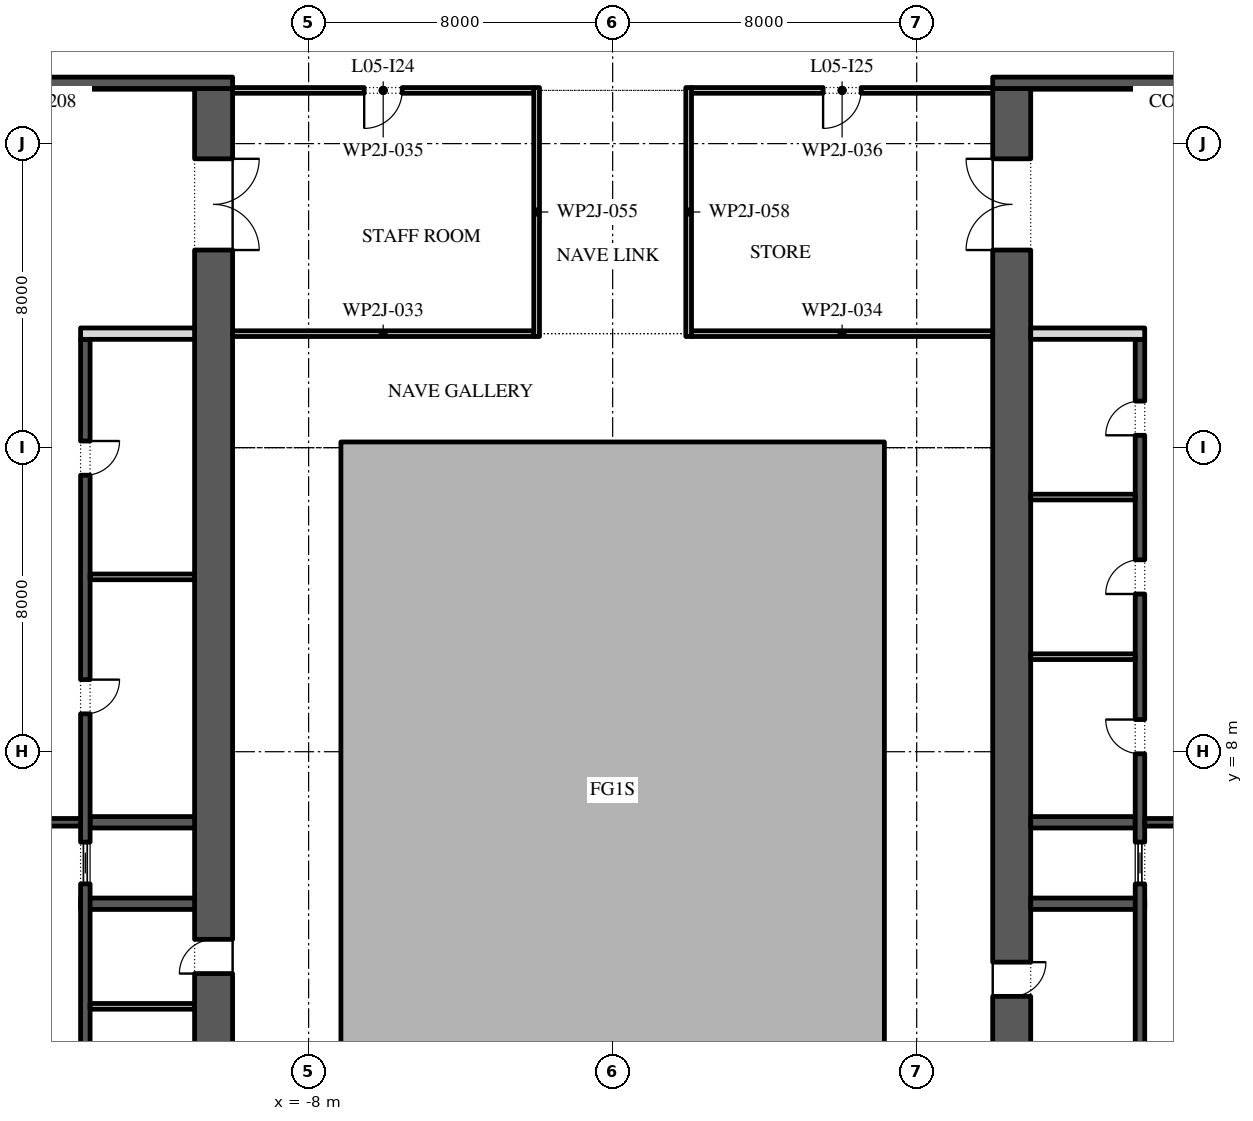
"""IFC4 building model, lengths in metres.
Left out: names, types, materials, properties, quantities, classifications, styles, units other than length and angle.
Written with IfcOpenShell. Run it as: python <this file> out.ifc"""

import sys

from ifc_helpers import new_model, si_unit, direction, frame, frame_2d, origin, place, context, subcontext, project, spatial, polyline, rectangle, outline, extrude, element, fill, save


model = new_model("IFC4")
c1 = context("Model", 3, precision=1e-05, world=origin(), true_north=direction((0.0, 1.0)))
c2 = subcontext(c1, "Body", "Model", "MODEL_VIEW")
j1 = project(units=[si_unit("LENGTHUNIT", "METRE"), si_unit("PLANEANGLEUNIT", "RADIAN")], contexts=[c1])
p1 = place(None, origin())
s1 = spatial("IfcSite", under=j1, at=p1, CompositionType="ELEMENT")
p2 = place(p1, origin())
s2 = spatial("IfcBuilding", under=s1, at=p2, CompositionType="ELEMENT")
p3 = place(p2, frame((0.0, 0.0, 28.8)))
s3 = spatial("IfcBuildingStorey", under=s2, at=p3, CompositionType="ELEMENT", Elevation=28.8)
p4 = place(p3, origin())
e1 = element("IfcWall", 1, at=p4, inside=s3, PredefinedType="STANDARD", context=c2, shape_type="SweptSolid", body=[
    extrude(outline(polyline([(-7.15, -2.15), (7.15, -2.15), (7.15, 16.15), (-7.15, 16.15), (-7.15, -2.15)]), holes=[polyline([(-7.0, -2.0), (-7.0, 16.0), (7.0, 16.0), (7.0, -2.0), (-7.0, -2.0)])]), origin(), (0.0, 0.0, 1.0), 4.35),
])
p5 = place(p3, frame((-10.5, -2.45, 0.0), z_axis=(0.0, 0.0, 1.0), x_axis=(0.0, 1.0, 0.0)))
e2 = element("IfcWall", 2, at=p5, inside=s3, PredefinedType="SHEAR", context=c2, shape_type="SweptSolid", body=[
    extrude(rectangle(XDim=27.9, YDim=1.0, at=frame_2d((13.95, 0.0))), origin(), (0.0, 0.0, 1.0), 4.35),
])
p6 = place(p5, frame((23.65, 0.0, 0.0)))
e3 = element("IfcOpeningElement", 3, at=p6, cuts=e2, PredefinedType="OPENING", context=c2, shape_type="SweptSolid", body=[
    extrude(rectangle(XDim=2.4, YDim=2.1, at=frame_2d((1.2, 1.05))), frame((0.0, 0.51, 0.0), z_axis=(0.0, -1.0, 0.0), x_axis=(1.0, 0.0, 0.0)), (0.0, 0.0, 1.0), 1.02),
])
p7 = place(p5, frame((1.387, 0.0, 0.0)))
e4 = element("IfcOpeningElement", 4, at=p7, cuts=e2, PredefinedType="OPENING", context=c2, shape_type="SweptSolid", body=[
    extrude(rectangle(XDim=0.9, YDim=2.1, at=frame_2d((0.45, 1.05))), frame((0.0, 0.51, 0.0), z_axis=(0.0, -1.0, 0.0), x_axis=(1.0, 0.0, 0.0)), (0.0, 0.0, 1.0), 1.02),
])
p8 = place(p5, frame((4.613, 0.0, 0.0)))
e5 = element("IfcOpeningElement", 5, at=p8, cuts=e2, PredefinedType="OPENING", context=c2, shape_type="SweptSolid", body=[
    extrude(rectangle(XDim=0.9, YDim=2.1, at=frame_2d((0.45, 1.05))), frame((0.0, 0.51, 0.0), z_axis=(0.0, -1.0, 0.0), x_axis=(1.0, 0.0, 0.0)), (0.0, 0.0, 1.0), 1.02),
])
p9 = place(p3, frame((-22.0, 25.6, 0.0), z_axis=(0.0, 0.0, 1.0), x_axis=(1.0, 0.0, 0.0)))
e6 = element("IfcWall", 6, at=p9, inside=s3, PredefinedType="SHEAR", context=c2, shape_type="SweptSolid", body=[
    extrude(rectangle(XDim=12.0, YDim=0.3, at=frame_2d((6.0, 0.0))), origin(), (0.0, 0.0, 1.0), 4.35),
])
p10 = place(p3, frame((-14.0, 4.0, 0.0), z_axis=(0.0, 0.0, 1.0), x_axis=(1.0, 0.0, 0.0)))
e7 = element("IfcWall", 7, at=p10, inside=s3, PredefinedType="SHEAR", context=c2, shape_type="SweptSolid", body=[
    extrude(rectangle(XDim=3.0, YDim=0.3, at=frame_2d((1.5, 0.0))), origin(), (0.0, 0.0, 1.0), 4.35),
])
p11 = place(p3, frame((-13.75, 6.143, 0.0), z_axis=(0.0, 0.0, 1.0), x_axis=(1.0, 0.0, 0.0)))
e8 = element("IfcWall", 8, at=p11, inside=s3, PredefinedType="SHEAR", context=c2, shape_type="SweptSolid", body=[
    extrude(rectangle(XDim=2.75, YDim=0.3, at=frame_2d((1.375, 0.0))), origin(), (0.0, 0.0, 1.0), 4.35),
])
p12 = place(p3, frame((-13.875, -2.45, 0.0), z_axis=(0.0, 0.0, 1.0), x_axis=(0.0, 1.0, 0.0)))
e9 = element("IfcWall", 9, at=p12, inside=s3, PredefinedType="SHEAR", context=c2, shape_type="SweptSolid", body=[
    extrude(rectangle(XDim=21.3, YDim=0.25, at=frame_2d((10.65, 0.0))), origin(), (0.0, 0.0, 1.0), 4.35),
])
p13 = place(p12, frame((11.446, 0.0, 0.0)))
e10 = element("IfcOpeningElement", 10, at=p13, cuts=e9, PredefinedType="OPENING", context=c2, shape_type="SweptSolid", body=[
    extrude(rectangle(XDim=0.9, YDim=2.1, at=frame_2d((0.45, 1.05))), frame((0.0, 0.135, 0.0), z_axis=(0.0, -1.0, 0.0), x_axis=(1.0, 0.0, 0.0)), (0.0, 0.0, 1.0), 0.27),
])
p14 = place(p12, frame((17.725, 0.0, 0.0)))
e11 = element("IfcOpeningElement", 11, at=p14, cuts=e9, PredefinedType="OPENING", context=c2, shape_type="SweptSolid", body=[
    extrude(rectangle(XDim=0.9, YDim=2.1, at=frame_2d((0.45, 1.05))), frame((0.0, 0.135, 0.0), z_axis=(0.0, -1.0, 0.0), x_axis=(1.0, 0.0, 0.0)), (0.0, 0.0, 1.0), 0.27),
])
p15 = place(p12, frame((6.971, 0.0, 0.0)))
e12 = element("IfcOpeningElement", 12, at=p15, cuts=e9, PredefinedType="OPENING", context=c2, shape_type="SweptSolid", body=[
    extrude(rectangle(XDim=1.1, YDim=2.1, at=frame_2d((0.55, 1.05))), frame((0.0, 0.135, 0.0), z_axis=(0.0, -1.0, 0.0), x_axis=(1.0, 0.0, 0.0)), (0.0, 0.0, 1.0), 0.27),
])
p16 = place(p3, frame((-14.0, 19.0, 0.0), z_axis=(0.0, 0.0, 1.0), x_axis=(1.0, 0.0, 0.0)))
e13 = element("IfcWall", 13, at=p16, inside=s3, PredefinedType="PARTITIONING", context=c2, shape_type="SweptSolid", body=[
    extrude(rectangle(XDim=3.0, YDim=0.3, at=frame_2d((1.5, 0.0))), origin(), (0.0, 0.0, 1.0), 4.35),
])
p17 = place(p3, frame((-13.75, 12.6, 0.0), z_axis=(0.0, 0.0, 1.0), x_axis=(1.0, 0.0, 0.0)))
e14 = element("IfcWall", 14, at=p17, inside=s3, PredefinedType="PARTITIONING", context=c2, shape_type="SweptSolid", body=[
    extrude(rectangle(XDim=2.75, YDim=0.15, at=frame_2d((1.375, 0.0))), origin(), (0.0, 0.0, 1.0), 4.35),
])
p18 = place(p3, frame((-18.0, 6.143, 0.0), z_axis=(0.0, 0.0, 1.0), x_axis=(1.0, 0.0, 0.0)))
e15 = element("IfcWall", 15, at=p18, inside=s3, PredefinedType="SHEAR", context=c2, shape_type="SweptSolid", body=[
    extrude(rectangle(XDim=4.0, YDim=0.2, at=frame_2d((2.0, 0.0))), origin(), (0.0, 0.0, 1.0), 4.35),
])
p19 = place(p18, frame((1.4, 0.0, 0.0)))
e16 = element("IfcOpeningElement", 16, at=p19, cuts=e15, PredefinedType="OPENING", context=c2, shape_type="SweptSolid", body=[
    extrude(rectangle(XDim=1.2, YDim=2.1, at=frame_2d((0.6, 1.05))), frame((0.0, 0.11, 0.0), z_axis=(0.0, -1.0, 0.0), x_axis=(1.0, 0.0, 0.0)), (0.0, 0.0, 1.0), 0.22),
])
p20 = place(p3, frame((-13.75, 1.3, 0.0), z_axis=(0.0, 0.0, 1.0), x_axis=(1.0, 0.0, 0.0)))
e17 = element("IfcWall", 17, at=p20, inside=s3, PredefinedType="PARTITIONING", context=c2, shape_type="SweptSolid", body=[
    extrude(rectangle(XDim=2.75, YDim=0.15, at=frame_2d((1.375, 0.0))), origin(), (0.0, 0.0, 1.0), 4.35),
])
p21 = place(p3, frame((10.5, -2.45, 0.0), z_axis=(0.0, 0.0, 1.0), x_axis=(0.0, 1.0, 0.0)))
e18 = element("IfcWall", 18, at=p21, inside=s3, PredefinedType="SHEAR", context=c2, shape_type="SweptSolid", body=[
    extrude(rectangle(XDim=27.9, YDim=1.0, at=frame_2d((13.95, 0.0))), origin(), (0.0, 0.0, 1.0), 4.35),
])
p22 = place(p21, frame((23.65, 0.0, 0.0)))
e19 = element("IfcOpeningElement", 19, at=p22, cuts=e18, PredefinedType="OPENING", context=c2, shape_type="SweptSolid", body=[
    extrude(rectangle(XDim=2.4, YDim=2.1, at=frame_2d((1.2, 1.05))), frame((0.0, 0.51, 0.0), z_axis=(0.0, -1.0, 0.0), x_axis=(1.0, 0.0, 0.0)), (0.0, 0.0, 1.0), 1.02),
])
p23 = place(p21, frame((0.788, 0.0, 0.0)))
e20 = element("IfcOpeningElement", 20, at=p23, cuts=e18, PredefinedType="OPENING", context=c2, shape_type="SweptSolid", body=[
    extrude(rectangle(XDim=0.9, YDim=2.1, at=frame_2d((0.45, 1.05))), frame((0.0, 0.51, 0.0), z_axis=(0.0, -1.0, 0.0), x_axis=(1.0, 0.0, 0.0)), (0.0, 0.0, 1.0), 1.02),
])
p24 = place(p21, frame((4.012, 0.0, 0.0)))
e21 = element("IfcOpeningElement", 21, at=p24, cuts=e18, PredefinedType="OPENING", context=c2, shape_type="SweptSolid", body=[
    extrude(rectangle(XDim=0.9, YDim=2.1, at=frame_2d((0.45, 1.05))), frame((0.0, 0.51, 0.0), z_axis=(0.0, -1.0, 0.0), x_axis=(1.0, 0.0, 0.0)), (0.0, 0.0, 1.0), 1.02),
])
p25 = place(p3, frame((10.0, 25.6, 0.0), z_axis=(0.0, 0.0, 1.0), x_axis=(1.0, 0.0, 0.0)))
e22 = element("IfcWall", 22, at=p25, inside=s3, PredefinedType="SHEAR", context=c2, shape_type="SweptSolid", body=[
    extrude(rectangle(XDim=12.0, YDim=0.3, at=frame_2d((6.0, 0.0))), origin(), (0.0, 0.0, 1.0), 4.35),
])
p26 = place(p3, frame((11.0, 4.0, 0.0), z_axis=(0.0, 0.0, 1.0), x_axis=(1.0, 0.0, 0.0)))
e23 = element("IfcWall", 23, at=p26, inside=s3, PredefinedType="SHEAR", context=c2, shape_type="SweptSolid", body=[
    extrude(rectangle(XDim=3.0, YDim=0.3, at=frame_2d((1.5, 0.0))), origin(), (0.0, 0.0, 1.0), 4.35),
])
p27 = place(p3, frame((11.0, 6.143, 0.0), z_axis=(0.0, 0.0, 1.0), x_axis=(1.0, 0.0, 0.0)))
e24 = element("IfcWall", 24, at=p27, inside=s3, PredefinedType="SHEAR", context=c2, shape_type="SweptSolid", body=[
    extrude(rectangle(XDim=2.75, YDim=0.3, at=frame_2d((1.375, 0.0))), origin(), (0.0, 0.0, 1.0), 4.35),
])
p28 = place(p3, frame((13.875, -2.45, 0.0), z_axis=(0.0, 0.0, 1.0), x_axis=(0.0, 1.0, 0.0)))
e25 = element("IfcWall", 25, at=p28, inside=s3, PredefinedType="SHEAR", context=c2, shape_type="SweptSolid", body=[
    extrude(rectangle(XDim=21.3, YDim=0.25, at=frame_2d((10.65, 0.0))), origin(), (0.0, 0.0, 1.0), 4.35),
])
p29 = place(p28, frame((10.396, 0.0, 0.0)))
e26 = element("IfcOpeningElement", 26, at=p29, cuts=e25, PredefinedType="OPENING", context=c2, shape_type="SweptSolid", body=[
    extrude(rectangle(XDim=0.9, YDim=2.1, at=frame_2d((0.45, 1.05))), frame((0.0, 0.135, 0.0), z_axis=(0.0, -1.0, 0.0), x_axis=(1.0, 0.0, 0.0)), (0.0, 0.0, 1.0), 0.27),
])
p30 = place(p28, frame((14.6, 0.0, 0.0)))
e27 = element("IfcOpeningElement", 27, at=p30, cuts=e25, PredefinedType="OPENING", context=c2, shape_type="SweptSolid", body=[
    extrude(rectangle(XDim=0.9, YDim=2.1, at=frame_2d((0.45, 1.05))), frame((0.0, 0.135, 0.0), z_axis=(0.0, -1.0, 0.0), x_axis=(1.0, 0.0, 0.0)), (0.0, 0.0, 1.0), 0.27),
])
p31 = place(p28, frame((18.775, 0.0, 0.0)))
e28 = element("IfcOpeningElement", 28, at=p31, cuts=e25, PredefinedType="OPENING", context=c2, shape_type="SweptSolid", body=[
    extrude(rectangle(XDim=0.9, YDim=2.1, at=frame_2d((0.45, 1.05))), frame((0.0, 0.135, 0.0), z_axis=(0.0, -1.0, 0.0), x_axis=(1.0, 0.0, 0.0)), (0.0, 0.0, 1.0), 0.27),
])
p32 = place(p28, frame((6.971, 0.0, 0.0)))
e29 = element("IfcOpeningElement", 29, at=p32, cuts=e25, PredefinedType="OPENING", context=c2, shape_type="SweptSolid", body=[
    extrude(rectangle(XDim=1.1, YDim=2.1, at=frame_2d((0.55, 1.05))), frame((0.0, 0.135, 0.0), z_axis=(0.0, -1.0, 0.0), x_axis=(1.0, 0.0, 0.0)), (0.0, 0.0, 1.0), 0.27),
])
p33 = place(p3, frame((11.0, 19.0, 0.0), z_axis=(0.0, 0.0, 1.0), x_axis=(1.0, 0.0, 0.0)))
e30 = element("IfcWall", 30, at=p33, inside=s3, PredefinedType="PARTITIONING", context=c2, shape_type="SweptSolid", body=[
    extrude(rectangle(XDim=3.0, YDim=0.3, at=frame_2d((1.5, 0.0))), origin(), (0.0, 0.0, 1.0), 4.35),
])
for number, where, z_axis, x_axis in (
    (31, (11.0, 10.5, 0.0), (0.0, 0.0, 1.0), (1.0, 0.0, 0.0)),
    (32, (11.0, 14.7, 0.0), (0.0, 0.0, 1.0), (1.0, 0.0, 0.0)),
):
    element("IfcWall", number, at=place(p3, frame(where, z_axis=z_axis, x_axis=x_axis)), inside=s3, PredefinedType="PARTITIONING", context=c2, shape_type="SweptSolid", body=[
        extrude(rectangle(XDim=2.75, YDim=0.15, at=frame_2d((1.375, 0.0))), origin(), (0.0, 0.0, 1.0), 4.35),
    ])
p34 = place(p3, frame((14.0, 6.143, 0.0), z_axis=(0.0, 0.0, 1.0), x_axis=(1.0, 0.0, 0.0)))
e33 = element("IfcWall", 33, at=p34, inside=s3, PredefinedType="SHEAR", context=c2, shape_type="SweptSolid", body=[
    extrude(rectangle(XDim=4.0, YDim=0.2, at=frame_2d((2.0, 0.0))), origin(), (0.0, 0.0, 1.0), 4.35),
])
p35 = place(p34, frame((1.4, 0.0, 0.0)))
e34 = element("IfcOpeningElement", 34, at=p35, cuts=e33, PredefinedType="OPENING", context=c2, shape_type="SweptSolid", body=[
    extrude(rectangle(XDim=1.2, YDim=2.1, at=frame_2d((0.6, 1.05))), frame((0.0, 0.11, 0.0), z_axis=(0.0, -1.0, 0.0), x_axis=(1.0, 0.0, 0.0)), (0.0, 0.0, 1.0), 0.22),
])
for number, where, z_axis, x_axis in (
    (35, (-10.0, 19.0, 0.0), (0.0, 0.0, 1.0), (1.0, 0.0, 0.0)),
    (36, (2.075, 19.0, 0.0), (0.0, 0.0, 1.0), (1.0, 0.0, 0.0)),
):
    element("IfcWall", number, at=place(p3, frame(where, z_axis=z_axis, x_axis=x_axis)), inside=s3, PredefinedType="PARTITIONING", context=c2, shape_type="SweptSolid", body=[
        extrude(rectangle(XDim=7.925, YDim=0.15, at=frame_2d((3.962, 0.0))), origin(), (0.0, 0.0, 1.0), 4.35),
    ])
p36 = place(p3, frame((-10.0, 25.4, 0.0), z_axis=(0.0, 0.0, 1.0), x_axis=(1.0, 0.0, 0.0)))
e37 = element("IfcWall", 37, at=p36, inside=s3, PredefinedType="PARTITIONING", context=c2, shape_type="SweptSolid", body=[
    extrude(rectangle(XDim=7.925, YDim=0.15, at=frame_2d((3.962, 0.0))), origin(), (0.0, 0.0, 1.0), 4.35),
])
p37 = place(p36, frame((3.462, 0.0, 0.0)))
e38 = element("IfcOpeningElement", 38, at=p37, cuts=e37, PredefinedType="OPENING", context=c2, shape_type="SweptSolid", body=[
    extrude(rectangle(XDim=1.0, YDim=2.1, at=frame_2d((0.5, 1.05))), frame((0.0, 0.085, 0.0), z_axis=(0.0, -1.0, 0.0), x_axis=(1.0, 0.0, 0.0)), (0.0, 0.0, 1.0), 0.17),
])
p38 = place(p3, frame((2.075, 25.4, 0.0), z_axis=(0.0, 0.0, 1.0), x_axis=(1.0, 0.0, 0.0)))
e39 = element("IfcWall", 39, at=p38, inside=s3, PredefinedType="PARTITIONING", context=c2, shape_type="SweptSolid", body=[
    extrude(rectangle(XDim=7.925, YDim=0.15, at=frame_2d((3.962, 0.0))), origin(), (0.0, 0.0, 1.0), 4.35),
])
p39 = place(p38, frame((3.462, 0.0, 0.0)))
e40 = element("IfcOpeningElement", 40, at=p39, cuts=e39, PredefinedType="OPENING", context=c2, shape_type="SweptSolid", body=[
    extrude(rectangle(XDim=1.0, YDim=2.1, at=frame_2d((0.5, 1.05))), frame((0.0, 0.085, 0.0), z_axis=(0.0, -1.0, 0.0), x_axis=(1.0, 0.0, 0.0)), (0.0, 0.0, 1.0), 0.17),
])
for number, where, z_axis, x_axis in (
    (41, (-2.0, 18.925, 0.0), (0.0, 0.0, 1.0), (0.0, 1.0, 0.0)),
    (42, (2.0, 18.925, 0.0), (0.0, 0.0, 1.0), (0.0, 1.0, 0.0)),
):
    element("IfcWall", number, at=place(p3, frame(where, z_axis=z_axis, x_axis=x_axis)), inside=s3, PredefinedType="PARTITIONING", context=c2, shape_type="SweptSolid", body=[
        extrude(rectangle(XDim=6.55, YDim=0.15, at=frame_2d((3.275, 0.0))), origin(), (0.0, 0.0, 1.0), 4.35),
    ])
p40 = place(p13, frame((0.9, -0.2, 0.0), z_axis=(0.0, 0.0, 1.0), x_axis=(-1.0, 0.0, 0.0)))
e43 = element("IfcDoor", 43, at=p40, inside=s3, OperationType="SINGLE_SWING_RIGHT", PredefinedType="DOOR", context=c2, shape_type="SweptSolid", body=[
    extrude(rectangle(XDim=0.9, YDim=2.1, at=frame_2d((0.45, 1.05))), frame((0.0, -0.075, 0.0), z_axis=(0.0, -1.0, 0.0), x_axis=(1.0, 0.0, 0.0)), (0.0, 0.0, 1.0), 0.05),
])
fill(e10, e43)
p41 = place(p14, frame((0.9, -0.2, 0.0), z_axis=(0.0, 0.0, 1.0), x_axis=(-1.0, 0.0, 0.0)))
e44 = element("IfcDoor", 44, at=p41, inside=s3, OperationType="SINGLE_SWING_RIGHT", PredefinedType="DOOR", context=c2, shape_type="SweptSolid", body=[
    extrude(rectangle(XDim=0.9, YDim=2.1, at=frame_2d((0.45, 1.05))), frame((0.0, -0.075, 0.0), z_axis=(0.0, -1.0, 0.0), x_axis=(1.0, 0.0, 0.0)), (0.0, 0.0, 1.0), 0.05),
])
fill(e11, e44)
p42 = place(p15, origin())
e45 = element("IfcDoor", 45, at=p42, inside=s3, OperationType="SLIDING_TO_LEFT", PredefinedType="DOOR", context=c2, shape_type="SweptSolid", body=[
    extrude(rectangle(XDim=1.1, YDim=2.1, at=frame_2d((0.55, 1.05))), frame((0.0, 0.025, 0.0), z_axis=(0.0, -1.0, 0.0), x_axis=(1.0, 0.0, 0.0)), (0.0, 0.0, 1.0), 0.05),
])
fill(e12, e45)
p43 = place(p6, frame((2.4, 0.0, 0.0), z_axis=(0.0, 0.0, 1.0), x_axis=(-1.0, 0.0, 0.0)))
e46 = element("IfcDoor", 46, at=p43, inside=s3, OperationType="DOUBLE_DOOR_SINGLE_SWING", PredefinedType="DOOR", context=c2, shape_type="SweptSolid", body=[
    extrude(rectangle(XDim=2.4, YDim=2.1, at=frame_2d((1.2, 1.05))), frame((0.0, 0.025, 0.0), z_axis=(0.0, -1.0, 0.0), x_axis=(1.0, 0.0, 0.0)), (0.0, 0.0, 1.0), 0.05),
])
fill(e3, e46)
p44 = place(p8, origin())
e47 = element("IfcDoor", 47, at=p44, inside=s3, OperationType="SINGLE_SWING_RIGHT", PredefinedType="DOOR", context=c2, shape_type="SweptSolid", body=[
    extrude(rectangle(XDim=0.9, YDim=2.1, at=frame_2d((0.45, 1.05))), frame((0.0, 0.5, 0.0), z_axis=(0.0, -1.0, 0.0), x_axis=(1.0, 0.0, 0.0)), (0.0, 0.0, 1.0), 0.05),
])
fill(e5, e47)
p45 = place(p29, origin())
e48 = element("IfcDoor", 48, at=p45, inside=s3, OperationType="SINGLE_SWING_LEFT", PredefinedType="DOOR", context=c2, shape_type="SweptSolid", body=[
    extrude(rectangle(XDim=0.9, YDim=2.1, at=frame_2d((0.45, 1.05))), frame((0.0, 0.125, 0.0), z_axis=(0.0, -1.0, 0.0), x_axis=(1.0, 0.0, 0.0)), (0.0, 0.0, 1.0), 0.05),
])
fill(e26, e48)
p46 = place(p30, origin())
e49 = element("IfcDoor", 49, at=p46, inside=s3, OperationType="SINGLE_SWING_RIGHT", PredefinedType="DOOR", context=c2, shape_type="SweptSolid", body=[
    extrude(rectangle(XDim=0.9, YDim=2.1, at=frame_2d((0.45, 1.05))), frame((0.0, 0.125, 0.0), z_axis=(0.0, -1.0, 0.0), x_axis=(1.0, 0.0, 0.0)), (0.0, 0.0, 1.0), 0.05),
])
fill(e27, e49)
p47 = place(p31, origin())
e50 = element("IfcDoor", 50, at=p47, inside=s3, OperationType="SINGLE_SWING_RIGHT", PredefinedType="DOOR", context=c2, shape_type="SweptSolid", body=[
    extrude(rectangle(XDim=0.9, YDim=2.1, at=frame_2d((0.45, 1.05))), frame((0.0, 0.125, 0.0), z_axis=(0.0, -1.0, 0.0), x_axis=(1.0, 0.0, 0.0)), (0.0, 0.0, 1.0), 0.05),
])
fill(e28, e50)
p48 = place(p32, origin())
e51 = element("IfcDoor", 51, at=p48, inside=s3, OperationType="SLIDING_TO_LEFT", PredefinedType="DOOR", context=c2, shape_type="SweptSolid", body=[
    extrude(rectangle(XDim=1.1, YDim=2.1, at=frame_2d((0.55, 1.05))), frame((0.0, 0.025, 0.0), z_axis=(0.0, -1.0, 0.0), x_axis=(1.0, 0.0, 0.0)), (0.0, 0.0, 1.0), 0.05),
])
fill(e29, e51)
p49 = place(p22, origin())
e52 = element("IfcDoor", 52, at=p49, inside=s3, OperationType="DOUBLE_DOOR_SINGLE_SWING", PredefinedType="DOOR", context=c2, shape_type="SweptSolid", body=[
    extrude(rectangle(XDim=2.4, YDim=2.1, at=frame_2d((1.2, 1.05))), frame((0.0, 0.025, 0.0), z_axis=(0.0, -1.0, 0.0), x_axis=(1.0, 0.0, 0.0)), (0.0, 0.0, 1.0), 0.05),
])
fill(e19, e52)
p50 = place(p24, frame((0.9, -0.95, 0.0), z_axis=(0.0, 0.0, 1.0), x_axis=(-1.0, 0.0, 0.0)))
e53 = element("IfcDoor", 53, at=p50, inside=s3, OperationType="SINGLE_SWING_RIGHT", PredefinedType="DOOR", context=c2, shape_type="SweptSolid", body=[
    extrude(rectangle(XDim=0.9, YDim=2.1, at=frame_2d((0.45, 1.05))), frame((0.0, -0.45, 0.0), z_axis=(0.0, -1.0, 0.0), x_axis=(1.0, 0.0, 0.0)), (0.0, 0.0, 1.0), 0.05),
])
fill(e21, e53)
p51 = place(p37, frame((1.0, 0.0, 0.0), z_axis=(0.0, 0.0, 1.0), x_axis=(-1.0, 0.0, 0.0)))
e54 = element("IfcDoor", 54, at=p51, inside=s3, OperationType="SINGLE_SWING_LEFT", PredefinedType="DOOR", context=c2, shape_type="SweptSolid", body=[
    extrude(rectangle(XDim=1.0, YDim=2.1, at=frame_2d((0.5, 1.05))), frame((0.0, 0.025, 0.0), z_axis=(0.0, -1.0, 0.0), x_axis=(1.0, 0.0, 0.0)), (0.0, 0.0, 1.0), 0.05),
])
fill(e38, e54)
p52 = place(p39, frame((1.0, 0.0, 0.0), z_axis=(0.0, 0.0, 1.0), x_axis=(-1.0, 0.0, 0.0)))
e55 = element("IfcDoor", 55, at=p52, inside=s3, OperationType="SINGLE_SWING_LEFT", PredefinedType="DOOR", context=c2, shape_type="SweptSolid", body=[
    extrude(rectangle(XDim=1.0, YDim=2.1, at=frame_2d((0.5, 1.05))), frame((0.0, 0.025, 0.0), z_axis=(0.0, -1.0, 0.0), x_axis=(1.0, 0.0, 0.0)), (0.0, 0.0, 1.0), 0.05),
])
fill(e40, e55)
save(model, sys.argv[1])
